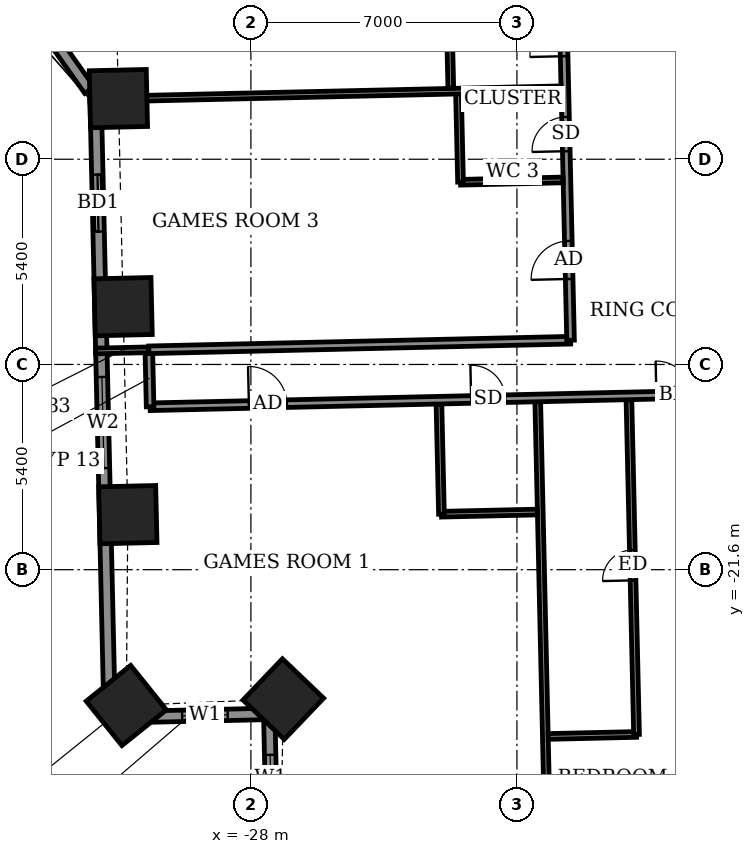
"""IFC4 building model, lengths in metres.
Left out: names, types, materials, properties, quantities, classifications, styles, units other than length and angle.
Written with IfcOpenShell. Run it as: python <this file> out.ifc"""

import sys

from ifc_helpers import new_model, si_unit, direction, frame, frame_2d, origin, origin_2d, place, context, subcontext, project, spatial, rectangle, extrude, element, fill, save


model = new_model("IFC4")
c1 = context("Model", 3, precision=1e-05, world=origin(), true_north=direction((0.0, 1.0)))
c2 = subcontext(c1, "Body", "Model", "MODEL_VIEW")
j1 = project(units=[si_unit("LENGTHUNIT", "METRE"), si_unit("PLANEANGLEUNIT", "RADIAN")], contexts=[c1])
p1 = place(None, origin())
s1 = spatial("IfcSite", under=j1, at=p1, CompositionType="ELEMENT")
p2 = place(p1, origin())
s2 = spatial("IfcBuilding", under=s1, at=p2, CompositionType="ELEMENT")
p3 = place(p2, frame((0.0, 0.0, 48.5)))
s3 = spatial("IfcBuildingStorey", under=s2, at=p3, CompositionType="ELEMENT", Elevation=48.5)
for number, where, z_axis, x_axis in (
    (1, (-31.486, -9.205, -0.55), (0.0, 0.0, 1.0), (0.023, -1.0, 0.0)),
    (2, (-31.362, -14.679, -0.55), (0.0, 0.0, 1.0), (0.023, -1.0, 0.0)),
    (3, (-31.238, -20.152, -0.55), (0.0, 0.0, 1.0), (0.023, -1.0, 0.0)),
    (4, (-31.278, -25.173, -0.55), (0.0, 0.0, 1.0), (0.627, -0.779, 0.0)),
    (5, (-27.147, -25.005, -0.55), (0.0, 0.0, 1.0), (0.723, -0.691, 0.0)),
):
    element("IfcColumn", number, at=place(p3, frame(where, z_axis=z_axis, x_axis=x_axis)), inside=s3, PredefinedType="COLUMN", context=c2, shape_type="SweptSolid", body=[
        extrude(rectangle(XDim=1.5, YDim=1.5, at=origin_2d()), origin(), (0.0, 0.0, 1.0), 3.6),
    ])
p4 = place(p3, frame((-34.315, -6.066, 0.0), z_axis=(0.0, 0.0, 1.0), x_axis=(0.578062893695, -0.815992212544, 0.0)))
e6 = element("IfcWall", 6, at=p4, inside=s3, PredefinedType="SOLIDWALL", context=c2, shape_type="SweptSolid", body=[
    extrude(rectangle(XDim=3.569, YDim=0.3, at=frame_2d((1.784, 0.0))), origin(), (0.0, 0.0, 1.0), 3.05),
])
p5 = place(p4, frame((0.338, 0.0, 0.9)))
e7 = element("IfcOpeningElement", 7, at=p5, cuts=e6, PredefinedType="OPENING", context=c2, shape_type="SweptSolid", body=[
    extrude(rectangle(XDim=1.2, YDim=1.5, at=frame_2d((0.6, 0.75))), frame((0.0, 0.16, 0.0), z_axis=(0.0, -1.0, 0.0), x_axis=(1.0, 0.0, 0.0)), (0.0, 0.0, 1.0), 0.32),
])
p6 = place(p3, frame((-32.087, -9.164, 0.0), z_axis=(0.0, 0.0, 1.0), x_axis=(0.022651102902, -0.999743430855, 0.0)))
e8 = element("IfcWall", 8, at=p6, inside=s3, PredefinedType="SOLIDWALL", context=c2, shape_type="SweptSolid", body=[
    extrude(rectangle(XDim=16.329, YDim=0.3, at=frame_2d((8.165, 0.0))), origin(), (0.0, 0.0, 1.0), 3.05),
])
p7 = place(p6, frame((2.042, 0.0, 0.0)))
e9 = element("IfcOpeningElement", 9, at=p7, cuts=e8, PredefinedType="OPENING", context=c2, shape_type="SweptSolid", body=[
    extrude(rectangle(XDim=1.5, YDim=2.4, at=frame_2d((0.75, 1.2))), frame((0.0, 0.16, 0.0), z_axis=(0.0, -1.0, 0.0), x_axis=(1.0, 0.0, 0.0)), (0.0, 0.0, 1.0), 0.32),
])
p8 = place(p6, frame((7.367, 0.0, 0.9)))
e10 = element("IfcOpeningElement", 10, at=p8, cuts=e8, PredefinedType="OPENING", context=c2, shape_type="SweptSolid", body=[
    extrude(rectangle(XDim=2.4, YDim=1.5, at=frame_2d((1.2, 0.75))), frame((0.0, 0.16, 0.0), z_axis=(0.0, -1.0, 0.0), x_axis=(1.0, 0.0, 0.0)), (0.0, 0.0, 1.0), 0.32),
])
p9 = place(p3, frame((-31.717, -25.489, 0.0), z_axis=(0.0, 0.0, 1.0), x_axis=(0.999744320311, 0.022611811187, 0.0)))
e11 = element("IfcWall", 11, at=p9, inside=s3, PredefinedType="SOLIDWALL", context=c2, shape_type="SweptSolid", body=[
    extrude(rectangle(XDim=4.2, YDim=0.3, at=frame_2d((2.1, 0.0))), origin(), (0.0, 0.0, 1.0), 2.55),
])
p10 = place(p9, frame((1.908, 0.0, 0.9)))
e12 = element("IfcOpeningElement", 12, at=p10, cuts=e11, PredefinedType="OPENING", context=c2, shape_type="SweptSolid", body=[
    extrude(rectangle(XDim=1.2, YDim=1.5, at=frame_2d((0.6, 0.75))), frame((0.0, 0.16, 0.0), z_axis=(0.0, -1.0, 0.0), x_axis=(1.0, 0.0, 0.0)), (0.0, 0.0, 1.0), 0.32),
])
p11 = place(p3, frame((-27.518, -25.394, 0.0), z_axis=(0.0, 0.0, 1.0), x_axis=(0.022611811187, -0.999744320311, 0.0)))
e13 = element("IfcWall", 13, at=p11, inside=s3, PredefinedType="SOLIDWALL", context=c2, shape_type="SweptSolid", body=[
    extrude(rectangle(XDim=4.2, YDim=0.3, at=frame_2d((2.1, 0.0))), origin(), (0.0, 0.0, 1.0), 2.55),
])
p12 = place(p11, frame((1.077, 0.0, 0.9)))
e14 = element("IfcOpeningElement", 14, at=p12, cuts=e13, PredefinedType="OPENING", context=c2, shape_type="SweptSolid", body=[
    extrude(rectangle(XDim=1.2, YDim=1.5, at=frame_2d((0.6, 0.75))), frame((0.0, 0.16, 0.0), z_axis=(0.0, -1.0, 0.0), x_axis=(1.0, 0.0, 0.0)), (0.0, 0.0, 1.0), 0.32),
])
p13 = place(p3, frame((-33.163, -25.672, 0.0), z_axis=(0.0, 0.0, 1.0), x_axis=(-0.022539561751, 0.999745951808, 0.0)))
e15 = element("IfcWall", 15, at=p13, inside=s3, PredefinedType="USERDEFINED", context=c2, shape_type="SweptSolid", body=[
    extrude(rectangle(XDim=4.3, YDim=0.55, at=frame_2d((2.15, 0.0))), origin(), (0.0, 0.0, 1.0), 0.8),
])
p14 = place(p3, frame((-20.171, -29.579, 0.0), z_axis=(0.0, 0.0, 1.0), x_axis=(-0.022661029756, 0.999743205894, 0.0)))
e16 = element("IfcWall", 16, at=p14, inside=s3, PredefinedType="PARTITIONING", context=c2, shape_type="SweptSolid", body=[
    extrude(rectangle(XDim=12.4, YDim=0.15, at=frame_2d((6.2, 0.0))), origin(), (0.0, 0.0, 1.0), 3.05),
])
p15 = place(p3, frame((-20.178, -25.988, 0.0), z_axis=(0.0, 0.0, 1.0), x_axis=(0.999740478815, 0.022781023197, 0.0)))
e17 = element("IfcWall", 17, at=p15, inside=s3, PredefinedType="PARTITIONING", context=c2, shape_type="SweptSolid", body=[
    extrude(rectangle(XDim=2.325, YDim=0.15, at=frame_2d((1.163, 0.0))), origin(), (0.0, 0.0, 1.0), 3.05),
])
p16 = place(p3, frame((-17.853, -25.935, 0.0), z_axis=(0.0, 0.0, 1.0), x_axis=(-0.022694967989, 0.999742436044, 0.0)))
e18 = element("IfcWall", 18, at=p16, inside=s3, PredefinedType="PARTITIONING", context=c2, shape_type="SweptSolid", body=[
    extrude(rectangle(XDim=8.81, YDim=0.15, at=frame_2d((4.405, 0.0))), origin(), (0.0, 0.0, 1.0), 3.05),
])
p17 = place(p16, frame((4.055, 0.0, 0.0)))
e19 = element("IfcOpeningElement", 19, at=p17, cuts=e18, PredefinedType="OPENING", context=c2, shape_type="SweptSolid", body=[
    extrude(rectangle(XDim=0.8, YDim=2.1, at=frame_2d((0.4, 1.05))), frame((0.0, 0.085, 0.0), z_axis=(0.0, -1.0, 0.0), x_axis=(1.0, 0.0, 0.0)), (0.0, 0.0, 1.0), 0.17),
])
p18 = place(p3, frame((-22.986, -20.14, 0.0), z_axis=(0.0, 0.0, 1.0), x_axis=(0.999746160391, 0.022530308093, 0.0)))
e20 = element("IfcWall", 20, at=p18, inside=s3, PredefinedType="PARTITIONING", context=c2, shape_type="SweptSolid", body=[
    extrude(rectangle(XDim=2.525, YDim=0.15, at=frame_2d((1.262, 0.0))), origin(), (0.0, 0.0, 1.0), 3.05),
])
p19 = place(p3, frame((-22.986, -20.14, 0.0), z_axis=(0.0, 0.0, 1.0), x_axis=(-0.022732880677, 0.999741574676, 0.0)))
e21 = element("IfcWall", 21, at=p19, inside=s3, PredefinedType="PARTITIONING", context=c2, shape_type="SweptSolid", body=[
    extrude(rectangle(XDim=2.9, YDim=0.15, at=frame_2d((1.45, 0.0))), origin(), (0.0, 0.0, 1.0), 3.05),
])
p20 = place(p3, frame((-30.652, -17.313, 0.0), z_axis=(0.0, 0.0, 1.0), x_axis=(0.999742623764, 0.02268669719, 0.0)))
e22 = element("IfcWall", 22, at=p20, inside=s3, PredefinedType="PARTITIONING", context=c2, shape_type="SweptSolid", body=[
    extrude(rectangle(XDim=58.8, YDim=0.2, at=frame_2d((29.4, 0.0))), origin(), (0.0, 0.0, 1.0), 3.05),
])
p21 = place(p20, frame((2.6, 0.0, 0.0)))
e23 = element("IfcOpeningElement", 23, at=p21, cuts=e22, PredefinedType="OPENING", context=c2, shape_type="SweptSolid", body=[
    extrude(rectangle(XDim=1.0, YDim=2.1, at=frame_2d((0.5, 1.05))), frame((0.0, 0.11, 0.0), z_axis=(0.0, -1.0, 0.0), x_axis=(1.0, 0.0, 0.0)), (0.0, 0.0, 1.0), 0.22),
])
p22 = place(p20, frame((8.45, 0.0, 0.0)))
e24 = element("IfcOpeningElement", 24, at=p22, cuts=e22, PredefinedType="OPENING", context=c2, shape_type="SweptSolid", body=[
    extrude(rectangle(XDim=0.9, YDim=2.1, at=frame_2d((0.45, 1.05))), frame((0.0, 0.11, 0.0), z_axis=(0.0, -1.0, 0.0), x_axis=(1.0, 0.0, 0.0)), (0.0, 0.0, 1.0), 0.22),
])
p23 = place(p20, frame((13.325, 0.0, 0.0)))
e25 = element("IfcOpeningElement", 25, at=p23, cuts=e22, PredefinedType="OPENING", context=c2, shape_type="SweptSolid", body=[
    extrude(rectangle(XDim=0.9, YDim=2.1, at=frame_2d((0.45, 1.05))), frame((0.0, 0.11, 0.0), z_axis=(0.0, -1.0, 0.0), x_axis=(1.0, 0.0, 0.0)), (0.0, 0.0, 1.0), 0.22),
])
p24 = place(p20, frame((15.7, 0.0, 0.0)))
e26 = element("IfcOpeningElement", 26, at=p24, cuts=e22, PredefinedType="OPENING", context=c2, shape_type="SweptSolid", body=[
    extrude(rectangle(XDim=0.9, YDim=2.1, at=frame_2d((0.45, 1.05))), frame((0.0, 0.11, 0.0), z_axis=(0.0, -1.0, 0.0), x_axis=(1.0, 0.0, 0.0)), (0.0, 0.0, 1.0), 0.22),
])
p25 = place(p20, frame((22.725, 0.0, 0.0)))
e27 = element("IfcOpeningElement", 27, at=p25, cuts=e22, PredefinedType="OPENING", context=c2, shape_type="SweptSolid", body=[
    extrude(rectangle(XDim=0.9, YDim=2.1, at=frame_2d((0.45, 1.05))), frame((0.0, 0.11, 0.0), z_axis=(0.0, -1.0, 0.0), x_axis=(1.0, 0.0, 0.0)), (0.0, 0.0, 1.0), 0.22),
])
p26 = place(p20, frame((24.875, 0.0, 0.0)))
e28 = element("IfcOpeningElement", 28, at=p26, cuts=e22, PredefinedType="OPENING", context=c2, shape_type="SweptSolid", body=[
    extrude(rectangle(XDim=0.9, YDim=2.1, at=frame_2d((0.45, 1.05))), frame((0.0, 0.11, 0.0), z_axis=(0.0, -1.0, 0.0), x_axis=(1.0, 0.0, 0.0)), (0.0, 0.0, 1.0), 0.22),
])
p27 = place(p20, frame((31.825, 0.0, 0.0)))
e29 = element("IfcOpeningElement", 29, at=p27, cuts=e22, PredefinedType="OPENING", context=c2, shape_type="SweptSolid", body=[
    extrude(rectangle(XDim=0.9, YDim=2.1, at=frame_2d((0.45, 1.05))), frame((0.0, 0.11, 0.0), z_axis=(0.0, -1.0, 0.0), x_axis=(1.0, 0.0, 0.0)), (0.0, 0.0, 1.0), 0.22),
])
p28 = place(p20, frame((34.025, 0.0, 0.0)))
e30 = element("IfcOpeningElement", 30, at=p28, cuts=e22, PredefinedType="OPENING", context=c2, shape_type="SweptSolid", body=[
    extrude(rectangle(XDim=0.9, YDim=2.1, at=frame_2d((0.45, 1.05))), frame((0.0, 0.11, 0.0), z_axis=(0.0, -1.0, 0.0), x_axis=(1.0, 0.0, 0.0)), (0.0, 0.0, 1.0), 0.22),
])
p29 = place(p20, frame((41.325, 0.0, 0.0)))
e31 = element("IfcOpeningElement", 31, at=p29, cuts=e22, PredefinedType="OPENING", context=c2, shape_type="SweptSolid", body=[
    extrude(rectangle(XDim=0.9, YDim=2.1, at=frame_2d((0.45, 1.05))), frame((0.0, 0.11, 0.0), z_axis=(0.0, -1.0, 0.0), x_axis=(1.0, 0.0, 0.0)), (0.0, 0.0, 1.0), 0.22),
])
p30 = place(p20, frame((43.7, 0.0, 0.0)))
e32 = element("IfcOpeningElement", 32, at=p30, cuts=e22, PredefinedType="OPENING", context=c2, shape_type="SweptSolid", body=[
    extrude(rectangle(XDim=0.9, YDim=2.1, at=frame_2d((0.45, 1.05))), frame((0.0, 0.11, 0.0), z_axis=(0.0, -1.0, 0.0), x_axis=(1.0, 0.0, 0.0)), (0.0, 0.0, 1.0), 0.22),
])
p31 = place(p20, frame((50.65, 0.0, 0.0)))
e33 = element("IfcOpeningElement", 33, at=p31, cuts=e22, PredefinedType="OPENING", context=c2, shape_type="SweptSolid", body=[
    extrude(rectangle(XDim=0.9, YDim=2.1, at=frame_2d((0.45, 1.05))), frame((0.0, 0.11, 0.0), z_axis=(0.0, -1.0, 0.0), x_axis=(1.0, 0.0, 0.0)), (0.0, 0.0, 1.0), 0.22),
])
p32 = place(p20, frame((55.304, 0.0, 0.0)))
e34 = element("IfcOpeningElement", 34, at=p32, cuts=e22, PredefinedType="OPENING", context=c2, shape_type="SweptSolid", body=[
    extrude(rectangle(XDim=1.0, YDim=2.1, at=frame_2d((0.5, 1.05))), frame((0.0, 0.11, 0.0), z_axis=(0.0, -1.0, 0.0), x_axis=(1.0, 0.0, 0.0)), (0.0, 0.0, 1.0), 0.22),
])
p33 = place(p3, frame((-30.652, -17.313, 0.0), z_axis=(0.0, 0.0, 1.0), x_axis=(-0.022632637625, 0.99974384905, 0.0)))
e35 = element("IfcWall", 35, at=p33, inside=s3, PredefinedType="PARTITIONING", context=c2, shape_type="SweptSolid", body=[
    extrude(rectangle(XDim=1.5, YDim=0.2, at=frame_2d((0.75, 0.0))), origin(), (0.0, 0.0, 1.0), 3.05),
])
p34 = place(p3, frame((-32.086, -15.845, 0.0), z_axis=(0.0, 0.0, 1.0), x_axis=(0.999754810245, 0.022143156767, 0.0)))
e36 = element("IfcWall", 36, at=p34, inside=s3, PredefinedType="PARTITIONING", context=c2, shape_type="SweptSolid", body=[
    extrude(rectangle(XDim=1.4, YDim=0.15, at=frame_2d((0.7, 0.0))), origin(), (0.0, 0.0, 1.0), 2.55),
])
p35 = place(p3, frame((-30.686, -15.814, 0.0), z_axis=(0.0, 0.0, 1.0), x_axis=(0.999742346277, 0.022698921993, 0.0)))
e37 = element("IfcWall", 37, at=p35, inside=s3, PredefinedType="PARTITIONING", context=c2, shape_type="SweptSolid", body=[
    extrude(rectangle(XDim=11.1, YDim=0.2, at=frame_2d((5.55, 0.0))), origin(), (0.0, 0.0, 1.0), 3.05),
])
p36 = place(p3, frame((-19.589, -15.562, 0.0), z_axis=(0.0, 0.0, 1.0), x_axis=(-0.02267447203, 0.999742901109, 0.0)))
e38 = element("IfcWall", 38, at=p36, inside=s3, PredefinedType="PARTITIONING", context=c2, shape_type="SweptSolid", body=[
    extrude(rectangle(XDim=27.65, YDim=0.2, at=frame_2d((13.825, 0.0))), origin(), (0.0, 0.0, 1.0), 3.05),
])
p37 = place(p36, frame((20.8, 0.0, 0.0)))
e39 = element("IfcOpeningElement", 39, at=p37, cuts=e38, PredefinedType="OPENING", context=c2, shape_type="SweptSolid", body=[
    extrude(rectangle(XDim=1.0, YDim=2.1, at=frame_2d((0.5, 1.05))), frame((0.0, 0.11, 0.0), z_axis=(0.0, -1.0, 0.0), x_axis=(1.0, 0.0, 0.0)), (0.0, 0.0, 1.0), 0.22),
])
p38 = place(p36, frame((22.975, 0.0, 0.0)))
e40 = element("IfcOpeningElement", 40, at=p38, cuts=e38, PredefinedType="OPENING", context=c2, shape_type="SweptSolid", body=[
    extrude(rectangle(XDim=0.9, YDim=2.1, at=frame_2d((0.45, 1.05))), frame((0.0, 0.11, 0.0), z_axis=(0.0, -1.0, 0.0), x_axis=(1.0, 0.0, 0.0)), (0.0, 0.0, 1.0), 0.22),
])
p39 = place(p36, frame((16.175, 0.0, 0.0)))
e41 = element("IfcOpeningElement", 41, at=p39, cuts=e38, PredefinedType="OPENING", context=c2, shape_type="SweptSolid", body=[
    extrude(rectangle(XDim=1.0, YDim=2.1, at=frame_2d((0.5, 1.05))), frame((0.0, 0.11, 0.0), z_axis=(0.0, -1.0, 0.0), x_axis=(1.0, 0.0, 0.0)), (0.0, 0.0, 1.0), 0.22),
])
p40 = place(p36, frame((18.625, 0.0, 0.0)))
e42 = element("IfcOpeningElement", 42, at=p40, cuts=e38, PredefinedType="OPENING", context=c2, shape_type="SweptSolid", body=[
    extrude(rectangle(XDim=0.9, YDim=2.1, at=frame_2d((0.45, 1.05))), frame((0.0, 0.11, 0.0), z_axis=(0.0, -1.0, 0.0), x_axis=(1.0, 0.0, 0.0)), (0.0, 0.0, 1.0), 0.22),
])
p41 = place(p36, frame((12.95, 0.0, 0.0)))
e43 = element("IfcOpeningElement", 43, at=p41, cuts=e38, PredefinedType="OPENING", context=c2, shape_type="SweptSolid", body=[
    extrude(rectangle(XDim=1.0, YDim=2.1, at=frame_2d((0.5, 1.05))), frame((0.0, 0.11, 0.0), z_axis=(0.0, -1.0, 0.0), x_axis=(1.0, 0.0, 0.0)), (0.0, 0.0, 1.0), 0.22),
])
p42 = place(p36, frame((9.775, 0.0, 0.0)))
e44 = element("IfcOpeningElement", 44, at=p42, cuts=e38, PredefinedType="OPENING", context=c2, shape_type="SweptSolid", body=[
    extrude(rectangle(XDim=1.0, YDim=2.1, at=frame_2d((0.5, 1.05))), frame((0.0, 0.11, 0.0), z_axis=(0.0, -1.0, 0.0), x_axis=(1.0, 0.0, 0.0)), (0.0, 0.0, 1.0), 0.22),
])
p43 = place(p36, frame((7.475, 0.0, 0.0)))
e45 = element("IfcOpeningElement", 45, at=p43, cuts=e38, PredefinedType="OPENING", context=c2, shape_type="SweptSolid", body=[
    extrude(rectangle(XDim=0.9, YDim=2.1, at=frame_2d((0.45, 1.05))), frame((0.0, 0.11, 0.0), z_axis=(0.0, -1.0, 0.0), x_axis=(1.0, 0.0, 0.0)), (0.0, 0.0, 1.0), 0.22),
])
p44 = place(p36, frame((1.612, 0.0, 0.0)))
e46 = element("IfcOpeningElement", 46, at=p44, cuts=e38, PredefinedType="OPENING", context=c2, shape_type="SweptSolid", body=[
    extrude(rectangle(XDim=1.0, YDim=2.1, at=frame_2d((0.5, 1.05))), frame((0.0, 0.11, 0.0), z_axis=(0.0, -1.0, 0.0), x_axis=(1.0, 0.0, 0.0)), (0.0, 0.0, 1.0), 0.22),
])
p45 = place(p36, frame((4.975, 0.0, 0.0)))
e47 = element("IfcOpeningElement", 47, at=p45, cuts=e38, PredefinedType="OPENING", context=c2, shape_type="SweptSolid", body=[
    extrude(rectangle(XDim=0.9, YDim=2.1, at=frame_2d((0.45, 1.05))), frame((0.0, 0.11, 0.0), z_axis=(0.0, -1.0, 0.0), x_axis=(1.0, 0.0, 0.0)), (0.0, 0.0, 1.0), 0.22),
])
p46 = place(p3, frame((-22.484, -11.406, 0.0), z_axis=(0.0, 0.0, 1.0), x_axis=(0.999744396973, 0.02260842146, 0.0)))
e48 = element("IfcWall", 48, at=p46, inside=s3, PredefinedType="PARTITIONING", context=c2, shape_type="SweptSolid", body=[
    extrude(rectangle(XDim=2.7, YDim=0.15, at=frame_2d((1.35, 0.0))), origin(), (0.0, 0.0, 1.0), 3.05),
])
p47 = place(p3, frame((-22.484, -11.401, 0.0), z_axis=(0.0, 0.0, 1.0), x_axis=(-0.022895561926, 0.999737862264, 0.0)))
e49 = element("IfcWall", 49, at=p47, inside=s3, PredefinedType="PARTITIONING", context=c2, shape_type="SweptSolid", body=[
    extrude(rectangle(XDim=2.324, YDim=0.15, at=frame_2d((1.162, 0.0))), origin(), (0.0, 0.0, 1.0), 3.05),
])
p48 = place(p3, frame((-32.236, -9.227, 0.0), z_axis=(0.0, 0.0, 1.0), x_axis=(0.999743195783, 0.022661475803, 0.0)))
e50 = element("IfcWall", 50, at=p48, inside=s3, PredefinedType="PARTITIONING", context=c2, shape_type="SweptSolid", body=[
    extrude(rectangle(XDim=12.4, YDim=0.15, at=frame_2d((6.2, 0.0))), origin(), (0.0, 0.0, 1.0), 3.05),
])
p49 = place(p3, frame((-22.74, -8.931, 0.0), z_axis=(0.0, 0.0, 1.0), x_axis=(-0.023015762656, 0.999735102249, 0.0)))
e51 = element("IfcWall", 51, at=p49, inside=s3, PredefinedType="PARTITIONING", context=c2, shape_type="SweptSolid", body=[
    extrude(rectangle(XDim=2.525, YDim=0.15, at=frame_2d((1.262, 0.0))), origin(), (0.0, 0.0, 1.0), 3.05),
])
p50 = place(p7, origin())
e52 = element("IfcDoor", 52, at=p50, inside=s3, OperationType="SLIDING_TO_LEFT", PredefinedType="DOOR", context=c2, shape_type="SweptSolid", body=[
    extrude(rectangle(XDim=1.5, YDim=2.4, at=frame_2d((0.75, 1.2))), frame((0.0, 0.025, 0.0), z_axis=(0.0, -1.0, 0.0), x_axis=(1.0, 0.0, 0.0)), (0.0, 0.0, 1.0), 0.05),
])
fill(e9, e52)
p51 = place(p8, origin())
e53 = element("IfcWindow", 53, at=p51, inside=s3, PartitioningType="DOUBLE_PANEL_VERTICAL", PredefinedType="WINDOW", context=c2, shape_type="SweptSolid", body=[
    extrude(rectangle(XDim=2.4, YDim=1.5, at=frame_2d((1.2, 0.75))), frame((0.0, 0.03, 0.0), z_axis=(0.0, -1.0, 0.0), x_axis=(1.0, 0.0, 0.0)), (0.0, 0.0, 1.0), 0.06),
])
fill(e10, e53)
p52 = place(p10, origin())
e54 = element("IfcWindow", 54, at=p52, inside=s3, PartitioningType="SINGLE_PANEL", PredefinedType="WINDOW", context=c2, shape_type="SweptSolid", body=[
    extrude(rectangle(XDim=1.2, YDim=1.5, at=frame_2d((0.6, 0.75))), frame((0.0, 0.03, 0.0), z_axis=(0.0, -1.0, 0.0), x_axis=(1.0, 0.0, 0.0)), (0.0, 0.0, 1.0), 0.06),
])
fill(e12, e54)
p53 = place(p12, origin())
e55 = element("IfcWindow", 55, at=p53, inside=s3, PartitioningType="SINGLE_PANEL", PredefinedType="WINDOW", context=c2, shape_type="SweptSolid", body=[
    extrude(rectangle(XDim=1.2, YDim=1.5, at=frame_2d((0.6, 0.75))), frame((0.0, 0.03, 0.0), z_axis=(0.0, -1.0, 0.0), x_axis=(1.0, 0.0, 0.0)), (0.0, 0.0, 1.0), 0.06),
])
fill(e14, e55)
p54 = place(p21, origin())
e56 = element("IfcDoor", 56, at=p54, inside=s3, OperationType="SINGLE_SWING_LEFT", PredefinedType="DOOR", context=c2, shape_type="SweptSolid", body=[
    extrude(rectangle(XDim=1.0, YDim=2.1, at=frame_2d((0.5, 1.05))), frame((0.0, 0.025, 0.0), z_axis=(0.0, -1.0, 0.0), x_axis=(1.0, 0.0, 0.0)), (0.0, 0.0, 1.0), 0.05),
])
fill(e23, e56)
p55 = place(p22, origin())
e57 = element("IfcDoor", 57, at=p55, inside=s3, OperationType="SINGLE_SWING_LEFT", PredefinedType="DOOR", context=c2, shape_type="SweptSolid", body=[
    extrude(rectangle(XDim=0.9, YDim=2.1, at=frame_2d((0.45, 1.05))), frame((0.0, 0.025, 0.0), z_axis=(0.0, -1.0, 0.0), x_axis=(1.0, 0.0, 0.0)), (0.0, 0.0, 1.0), 0.05),
])
fill(e24, e57)
p56 = place(p23, origin())
e58 = element("IfcDoor", 58, at=p56, inside=s3, OperationType="SINGLE_SWING_LEFT", PredefinedType="DOOR", context=c2, shape_type="SweptSolid", body=[
    extrude(rectangle(XDim=0.9, YDim=2.1, at=frame_2d((0.45, 1.05))), frame((0.0, 0.025, 0.0), z_axis=(0.0, -1.0, 0.0), x_axis=(1.0, 0.0, 0.0)), (0.0, 0.0, 1.0), 0.05),
])
fill(e25, e58)
p57 = place(p17, origin())
e59 = element("IfcDoor", 59, at=p57, inside=s3, OperationType="SINGLE_SWING_LEFT", PredefinedType="DOOR", context=c2, shape_type="SweptSolid", body=[
    extrude(rectangle(XDim=0.8, YDim=2.1, at=frame_2d((0.4, 1.05))), frame((0.0, 0.025, 0.0), z_axis=(0.0, -1.0, 0.0), x_axis=(1.0, 0.0, 0.0)), (0.0, 0.0, 1.0), 0.05),
])
fill(e19, e59)
p58 = place(p43, origin())
e60 = element("IfcDoor", 60, at=p58, inside=s3, OperationType="SINGLE_SWING_RIGHT", PredefinedType="DOOR", context=c2, shape_type="SweptSolid", body=[
    extrude(rectangle(XDim=0.9, YDim=2.1, at=frame_2d((0.45, 1.05))), frame((0.0, 0.025, 0.0), z_axis=(0.0, -1.0, 0.0), x_axis=(1.0, 0.0, 0.0)), (0.0, 0.0, 1.0), 0.05),
])
fill(e45, e60)
p59 = place(p44, origin())
e61 = element("IfcDoor", 61, at=p59, inside=s3, OperationType="SINGLE_SWING_LEFT", PredefinedType="DOOR", context=c2, shape_type="SweptSolid", body=[
    extrude(rectangle(XDim=1.0, YDim=2.1, at=frame_2d((0.5, 1.05))), frame((0.0, 0.025, 0.0), z_axis=(0.0, -1.0, 0.0), x_axis=(1.0, 0.0, 0.0)), (0.0, 0.0, 1.0), 0.05),
])
fill(e46, e61)
p60 = place(p45, origin())
e62 = element("IfcDoor", 62, at=p60, inside=s3, OperationType="SINGLE_SWING_LEFT", PredefinedType="DOOR", context=c2, shape_type="SweptSolid", body=[
    extrude(rectangle(XDim=0.9, YDim=2.1, at=frame_2d((0.45, 1.05))), frame((0.0, 0.025, 0.0), z_axis=(0.0, -1.0, 0.0), x_axis=(1.0, 0.0, 0.0)), (0.0, 0.0, 1.0), 0.05),
])
fill(e47, e62)
save(model, sys.argv[1])
